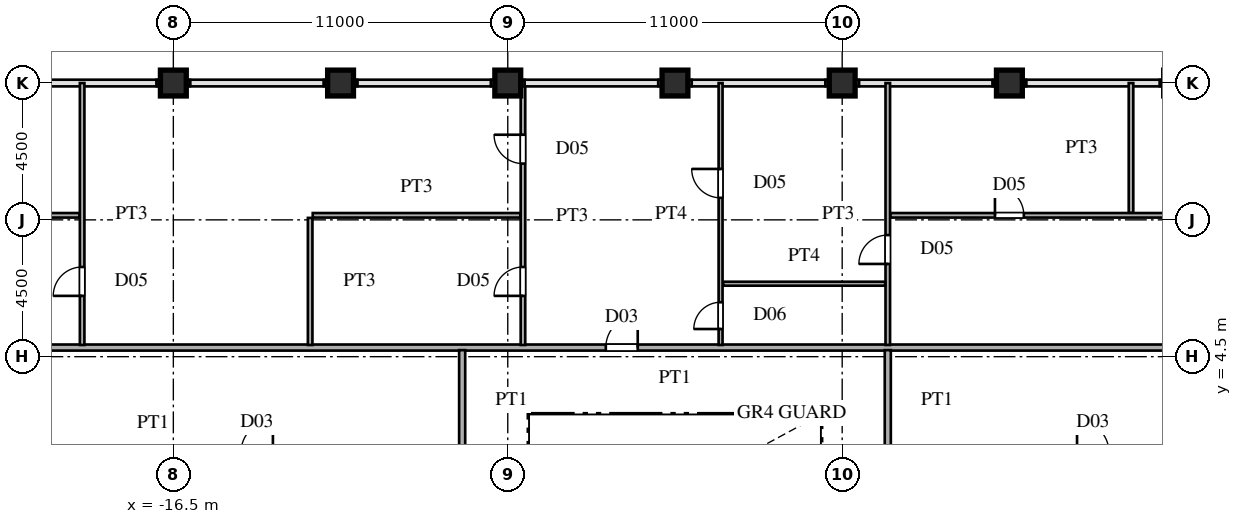
"""IFC4 building model, lengths in metres.
Left out: names, types, materials, properties, quantities, classifications, styles, units other than length and angle.
Written with IfcOpenShell. Run it as: python <this file> out.ifc"""

import sys

from ifc_helpers import new_model, si_unit, direction, frame, frame_2d, origin, origin_2d, place, context, subcontext, project, spatial, rectangle, hollow_rectangle, extrude, source, transform, mapped, element, fill, save


model = new_model("IFC4")
c1 = context("Model", 3, precision=1e-05, world=origin(), true_north=direction((0.0, 1.0)))
c2 = subcontext(c1, "Body", "Model", "MODEL_VIEW")
j1 = project(units=[si_unit("LENGTHUNIT", "METRE"), si_unit("PLANEANGLEUNIT", "RADIAN")], contexts=[c1])
p1 = place(None, origin())
s1 = spatial("IfcSite", under=j1, at=p1, CompositionType="ELEMENT")
p2 = place(p1, origin())
s2 = spatial("IfcBuilding", under=s1, at=p2, CompositionType="ELEMENT")
p3 = place(p2, frame((0.0, 0.0, 250.65)))
s3 = spatial("IfcBuildingStorey", under=s2, at=p3, CompositionType="ELEMENT", Elevation=250.65)
m1 = source(origin(), c2, "Body", "SweptSolid", [
    extrude(hollow_rectangle(XDim=0.85, YDim=0.85, WallThickness=0.036, at=origin_2d()), origin(), (0.0, 0.0, 1.0), 3.75),
])
for number, where, z_axis, x_axis in (
    (1, (-16.5, 13.5, 0.0), (0.0, 0.0, 1.0), (1.0, 0.0, 0.0)),
    (2, (-11.0, 13.5, 0.0), (0.0, 0.0, 1.0), (1.0, 0.0, 0.0)),
    (3, (-5.5, 13.5, 0.0), (0.0, 0.0, 1.0), (1.0, 0.0, 0.0)),
    (4, (0.0, 13.5, 0.0), (0.0, 0.0, 1.0), (1.0, 0.0, 0.0)),
    (5, (5.5, 13.5, 0.0), (0.0, 0.0, 1.0), (1.0, 0.0, 0.0)),
    (6, (11.0, 13.5, 0.0), (0.0, 0.0, 1.0), (1.0, 0.0, 0.0)),
):
    element("IfcColumn", number, at=place(p3, frame(where, z_axis=z_axis, x_axis=x_axis)), inside=s3, PredefinedType="COLUMN", context=c2, shape_type="MappedRepresentation", body=[
        mapped(m1, transform((0.0, 0.0, 0.0), scale=1.0)),
    ])
for number, where, z_axis, x_axis in (
    (7, (-17.05, 13.5, 0.0), (0.0, 0.0, 1.0), (1.0, 0.0, 0.0)),
    (8, (-11.55, 13.5, 0.0), (0.0, 0.0, 1.0), (1.0, 0.0, 0.0)),
    (9, (-6.05, 13.5, 0.0), (0.0, 0.0, 1.0), (1.0, 0.0, 0.0)),
    (10, (-0.55, 13.5, 0.0), (0.0, 0.0, 1.0), (1.0, 0.0, 0.0)),
    (11, (4.95, 13.5, 0.0), (0.0, 0.0, 1.0), (1.0, 0.0, 0.0)),
    (12, (10.45, 13.5, 0.0), (0.0, 0.0, 1.0), (1.0, 0.0, 0.0)),
    (13, (15.95, 13.5, 0.0), (0.0, 0.0, 1.0), (1.0, 0.0, 0.0)),
):
    element("IfcWall", number, at=place(p3, frame(where, z_axis=z_axis, x_axis=x_axis)), inside=s3, PredefinedType="SOLIDWALL", context=c2, shape_type="SweptSolid", body=[
        extrude(rectangle(XDim=1.1, YDim=0.21, at=frame_2d((0.55, 0.0))), origin(), (0.0, 0.0, 1.0), 3.03),
    ])
p4 = place(p3, frame((-27.245, 4.8, 0.0), z_axis=(0.0, 0.0, 1.0), x_axis=(1.0, 0.0, 0.0)))
e14 = element("IfcWall", 14, at=p4, inside=s3, PredefinedType="PARTITIONING", context=c2, shape_type="SweptSolid", body=[
    extrude(rectangle(XDim=54.49, YDim=0.2, at=frame_2d((27.245, 0.0))), origin(), (0.0, 0.0, 1.0), 3.53),
])
p5 = place(p4, frame((24.97, 0.0, 0.0)))
e15 = element("IfcOpeningElement", 15, at=p5, cuts=e14, PredefinedType="OPENING", context=c2, shape_type="SweptSolid", body=[
    extrude(rectangle(XDim=1.05, YDim=2.25, at=frame_2d((0.525, 1.125))), frame((0.0, 0.11, 0.0), z_axis=(0.0, -1.0, 0.0), x_axis=(1.0, 0.0, 0.0)), (0.0, 0.0, 1.0), 0.22),
])
p6 = place(p3, frame((1.585, 6.9, 0.0), z_axis=(0.0, 0.0, 1.0), x_axis=(1.0, 0.0, 0.0)))
e16 = element("IfcWall", 16, at=p6, inside=s3, PredefinedType="PARTITIONING", context=c2, shape_type="SweptSolid", body=[
    extrude(rectangle(XDim=5.33, YDim=0.13, at=frame_2d((2.665, 0.0))), origin(), (0.0, 0.0, 1.0), 3.53),
])
p7 = place(p3, frame((-27.245, 9.15, 0.0), z_axis=(0.0, 0.0, 1.0), x_axis=(1.0, 0.0, 0.0)))
e17 = element("IfcWall", 17, at=p7, inside=s3, PredefinedType="PARTITIONING", context=c2, shape_type="SweptSolid", body=[
    extrude(rectangle(XDim=7.66, YDim=0.15, at=frame_2d((3.83, 0.0))), origin(), (0.0, 0.0, 1.0), 3.53),
])
p8 = place(p7, frame((3.57, 0.0, 0.0)))
e18 = element("IfcOpeningElement", 18, at=p8, cuts=e17, PredefinedType="OPENING", context=c2, shape_type="SweptSolid", body=[
    extrude(rectangle(XDim=0.95, YDim=2.15, at=frame_2d((0.475, 1.075))), frame((0.0, 0.085, 0.0), z_axis=(0.0, -1.0, 0.0), x_axis=(1.0, 0.0, 0.0)), (0.0, 0.0, 1.0), 0.17),
])
p9 = place(p3, frame((-11.915, 9.15, 0.0), z_axis=(0.0, 0.0, 1.0), x_axis=(1.0, 0.0, 0.0)))
e19 = element("IfcWall", 19, at=p9, inside=s3, PredefinedType="PARTITIONING", context=c2, shape_type="SweptSolid", body=[
    extrude(rectangle(XDim=6.83, YDim=0.15, at=frame_2d((3.415, 0.0))), origin(), (0.0, 0.0, 1.0), 3.53),
])
p10 = place(p3, frame((7.085, 9.15, 0.0), z_axis=(0.0, 0.0, 1.0), x_axis=(1.0, 0.0, 0.0)))
e20 = element("IfcWall", 20, at=p10, inside=s3, PredefinedType="PARTITIONING", context=c2, shape_type="SweptSolid", body=[
    extrude(rectangle(XDim=20.16, YDim=0.15, at=frame_2d((10.08, 0.0))), origin(), (0.0, 0.0, 1.0), 3.53),
])
p11 = place(p10, frame((3.44, 0.0, 0.0)))
e21 = element("IfcOpeningElement", 21, at=p11, cuts=e20, PredefinedType="OPENING", context=c2, shape_type="SweptSolid", body=[
    extrude(rectangle(XDim=0.95, YDim=2.15, at=frame_2d((0.475, 1.075))), frame((0.0, 0.085, 0.0), z_axis=(0.0, -1.0, 0.0), x_axis=(1.0, 0.0, 0.0)), (0.0, 0.0, 1.0), 0.17),
])
p12 = place(p10, frame((10.69, 0.0, 0.0)))
e22 = element("IfcOpeningElement", 22, at=p12, cuts=e20, PredefinedType="OPENING", context=c2, shape_type="SweptSolid", body=[
    extrude(rectangle(XDim=0.95, YDim=2.15, at=frame_2d((0.475, 1.075))), frame((0.0, 0.085, 0.0), z_axis=(0.0, -1.0, 0.0), x_axis=(1.0, 0.0, 0.0)), (0.0, 0.0, 1.0), 0.17),
])
p13 = place(p10, frame((16.94, 0.0, 0.0)))
e23 = element("IfcOpeningElement", 23, at=p13, cuts=e20, PredefinedType="OPENING", context=c2, shape_type="SweptSolid", body=[
    extrude(rectangle(XDim=0.95, YDim=2.15, at=frame_2d((0.475, 1.075))), frame((0.0, 0.085, 0.0), z_axis=(0.0, -1.0, 0.0), x_axis=(1.0, 0.0, 0.0)), (0.0, 0.0, 1.0), 0.17),
])
p14 = place(p3, frame((-19.5, 4.885, 0.0), z_axis=(0.0, 0.0, 1.0), x_axis=(0.0, 1.0, 0.0)))
e24 = element("IfcWall", 24, at=p14, inside=s3, PredefinedType="PARTITIONING", context=c2, shape_type="SweptSolid", body=[
    extrude(rectangle(XDim=8.615, YDim=0.15, at=frame_2d((4.308, 0.0))), origin(), (0.0, 0.0, 1.0), 3.53),
])
p15 = place(p14, frame((1.615, 0.0, 0.0)))
e25 = element("IfcOpeningElement", 25, at=p15, cuts=e24, PredefinedType="OPENING", context=c2, shape_type="SweptSolid", body=[
    extrude(rectangle(XDim=0.95, YDim=2.15, at=frame_2d((0.475, 1.075))), frame((0.0, 0.085, 0.0), z_axis=(0.0, -1.0, 0.0), x_axis=(1.0, 0.0, 0.0)), (0.0, 0.0, 1.0), 0.17),
])
p16 = place(p3, frame((-12.0, 4.885, 0.0), z_axis=(0.0, 0.0, 1.0), x_axis=(0.0, 1.0, 0.0)))
e26 = element("IfcWall", 26, at=p16, inside=s3, PredefinedType="PARTITIONING", context=c2, shape_type="SweptSolid", body=[
    extrude(rectangle(XDim=4.18, YDim=0.15, at=frame_2d((2.09, 0.0))), origin(), (0.0, 0.0, 1.0), 3.53),
])
p17 = place(p3, frame((-7.0, 1.435, 0.0), z_axis=(0.0, 0.0, 1.0), x_axis=(0.0, 1.0, 0.0)))
e27 = element("IfcWall", 27, at=p17, inside=s3, PredefinedType="PARTITIONING", context=c2, shape_type="SweptSolid", body=[
    extrude(rectangle(XDim=3.28, YDim=0.2, at=frame_2d((1.64, 0.0))), origin(), (0.0, 0.0, 1.0), 3.53),
])
p18 = place(p3, frame((-5.0, 4.885, 0.0), z_axis=(0.0, 0.0, 1.0), x_axis=(0.0, 1.0, 0.0)))
e28 = element("IfcWall", 28, at=p18, inside=s3, PredefinedType="PARTITIONING", context=c2, shape_type="SweptSolid", body=[
    extrude(rectangle(XDim=8.505, YDim=0.15, at=frame_2d((4.252, 0.0))), origin(), (0.0, 0.0, 1.0), 3.53),
])
p19 = place(p18, frame((1.615, 0.0, 0.0)))
e29 = element("IfcOpeningElement", 29, at=p19, cuts=e28, PredefinedType="OPENING", context=c2, shape_type="SweptSolid", body=[
    extrude(rectangle(XDim=0.95, YDim=2.15, at=frame_2d((0.475, 1.075))), frame((0.0, 0.085, 0.0), z_axis=(0.0, -1.0, 0.0), x_axis=(1.0, 0.0, 0.0)), (0.0, 0.0, 1.0), 0.17),
])
p20 = place(p18, frame((5.965, 0.0, 0.0)))
e30 = element("IfcOpeningElement", 30, at=p20, cuts=e28, PredefinedType="OPENING", context=c2, shape_type="SweptSolid", body=[
    extrude(rectangle(XDim=0.95, YDim=2.15, at=frame_2d((0.475, 1.075))), frame((0.0, 0.085, 0.0), z_axis=(0.0, -1.0, 0.0), x_axis=(1.0, 0.0, 0.0)), (0.0, 0.0, 1.0), 0.17),
])
p21 = place(p3, frame((1.5, 4.885, 0.0), z_axis=(0.0, 0.0, 1.0), x_axis=(0.0, 1.0, 0.0)))
e31 = element("IfcWall", 31, at=p21, inside=s3, PredefinedType="PARTITIONING", context=c2, shape_type="SweptSolid", body=[
    extrude(rectangle(XDim=8.615, YDim=0.13, at=frame_2d((4.308, 0.0))), origin(), (0.0, 0.0, 1.0), 3.53),
])
p22 = place(p21, frame((0.525, 0.0, 0.0)))
e32 = element("IfcOpeningElement", 32, at=p22, cuts=e31, PredefinedType="OPENING", context=c2, shape_type="SweptSolid", body=[
    extrude(rectangle(XDim=0.88, YDim=2.1, at=frame_2d((0.44, 1.05))), frame((0.0, 0.075, 0.0), z_axis=(0.0, -1.0, 0.0), x_axis=(1.0, 0.0, 0.0)), (0.0, 0.0, 1.0), 0.15),
])
p23 = place(p21, frame((4.84, 0.0, 0.0)))
e33 = element("IfcOpeningElement", 33, at=p23, cuts=e31, PredefinedType="OPENING", context=c2, shape_type="SweptSolid", body=[
    extrude(rectangle(XDim=0.95, YDim=2.15, at=frame_2d((0.475, 1.075))), frame((0.0, 0.075, 0.0), z_axis=(0.0, -1.0, 0.0), x_axis=(1.0, 0.0, 0.0)), (0.0, 0.0, 1.0), 0.15),
])
p24 = place(p3, frame((7.0, 1.435, 0.0), z_axis=(0.0, 0.0, 1.0), x_axis=(0.0, 1.0, 0.0)))
e34 = element("IfcWall", 34, at=p24, inside=s3, PredefinedType="PARTITIONING", context=c2, shape_type="SweptSolid", body=[
    extrude(rectangle(XDim=3.28, YDim=0.2, at=frame_2d((1.64, 0.0))), origin(), (0.0, 0.0, 1.0), 3.53),
])
p25 = place(p3, frame((7.0, 4.885, 0.0), z_axis=(0.0, 0.0, 1.0), x_axis=(0.0, 1.0, 0.0)))
e35 = element("IfcWall", 35, at=p25, inside=s3, PredefinedType="PARTITIONING", context=c2, shape_type="SweptSolid", body=[
    extrude(rectangle(XDim=8.615, YDim=0.15, at=frame_2d((4.308, 0.0))), origin(), (0.0, 0.0, 1.0), 3.53),
])
p26 = place(p25, frame((2.665, 0.0, 0.0)))
e36 = element("IfcOpeningElement", 36, at=p26, cuts=e35, PredefinedType="OPENING", context=c2, shape_type="SweptSolid", body=[
    extrude(rectangle(XDim=0.95, YDim=2.15, at=frame_2d((0.475, 1.075))), frame((0.0, 0.085, 0.0), z_axis=(0.0, -1.0, 0.0), x_axis=(1.0, 0.0, 0.0)), (0.0, 0.0, 1.0), 0.17),
])
p27 = place(p3, frame((15.0, 9.235, 0.0), z_axis=(0.0, 0.0, 1.0), x_axis=(0.0, 1.0, 0.0)))
e37 = element("IfcWall", 37, at=p27, inside=s3, PredefinedType="PARTITIONING", context=c2, shape_type="SweptSolid", body=[
    extrude(rectangle(XDim=4.265, YDim=0.15, at=frame_2d((2.132, 0.0))), origin(), (0.0, 0.0, 1.0), 3.53),
])
m2 = source(origin(), c2, "Body", "SweptSolid", [
    extrude(rectangle(XDim=1.05, YDim=2.25, at=frame_2d((0.525, 1.125))), frame((0.0, 0.025, 0.0), z_axis=(0.0, -1.0, 0.0), x_axis=(1.0, 0.0, 0.0)), (0.0, 0.0, 1.0), 0.05),
])
p28 = place(p5, origin())
e38 = element("IfcDoor", 38, at=p28, inside=s3, OperationType="SINGLE_SWING_RIGHT", PredefinedType="DOOR", context=c2, shape_type="MappedRepresentation", body=[
    mapped(m2, transform((0.0, 0.0, 0.0), scale=1.0)),
])
fill(e15, e38)
m3 = source(origin(), c2, "Body", "SweptSolid", [
    extrude(rectangle(XDim=0.95, YDim=2.15, at=frame_2d((0.475, 1.075))), frame((0.0, 0.025, 0.0), z_axis=(0.0, -1.0, 0.0), x_axis=(1.0, 0.0, 0.0)), (0.0, 0.0, 1.0), 0.05),
])
p29 = place(p11, origin())
e39 = element("IfcDoor", 39, at=p29, inside=s3, OperationType="SINGLE_SWING_LEFT", PredefinedType="DOOR", context=c2, shape_type="MappedRepresentation", body=[
    mapped(m3, transform((0.0, 0.0, 0.0), scale=1.0)),
])
fill(e21, e39)
p30 = place(p15, origin())
e40 = element("IfcDoor", 40, at=p30, inside=s3, OperationType="SINGLE_SWING_LEFT", PredefinedType="DOOR", context=c2, shape_type="MappedRepresentation", body=[
    mapped(m3, transform((0.0, 0.0, 0.0), scale=1.0)),
])
fill(e25, e40)
p31 = place(p19, origin())
e41 = element("IfcDoor", 41, at=p31, inside=s3, OperationType="SINGLE_SWING_LEFT", PredefinedType="DOOR", context=c2, shape_type="MappedRepresentation", body=[
    mapped(m3, transform((0.0, 0.0, 0.0), scale=1.0)),
])
fill(e29, e41)
p32 = place(p20, origin())
e42 = element("IfcDoor", 42, at=p32, inside=s3, OperationType="SINGLE_SWING_RIGHT", PredefinedType="DOOR", context=c2, shape_type="MappedRepresentation", body=[
    mapped(m3, transform((0.0, 0.0, 0.0), scale=1.0)),
])
fill(e30, e42)
m4 = source(origin(), c2, "Body", "SweptSolid", [
    extrude(rectangle(XDim=0.88, YDim=2.1, at=frame_2d((0.44, 1.05))), frame((0.0, 0.025, 0.0), z_axis=(0.0, -1.0, 0.0), x_axis=(1.0, 0.0, 0.0)), (0.0, 0.0, 1.0), 0.05),
])
p33 = place(p22, origin())
e43 = element("IfcDoor", 43, at=p33, inside=s3, OperationType="SINGLE_SWING_LEFT", PredefinedType="DOOR", context=c2, shape_type="MappedRepresentation", body=[
    mapped(m4, transform((0.0, 0.0, 0.0), scale=1.0)),
])
fill(e32, e43)
p34 = place(p23, origin())
e44 = element("IfcDoor", 44, at=p34, inside=s3, OperationType="SINGLE_SWING_RIGHT", PredefinedType="DOOR", context=c2, shape_type="MappedRepresentation", body=[
    mapped(m3, transform((0.0, 0.0, 0.0), scale=1.0)),
])
fill(e33, e44)
p35 = place(p26, origin())
e45 = element("IfcDoor", 45, at=p35, inside=s3, OperationType="SINGLE_SWING_LEFT", PredefinedType="DOOR", context=c2, shape_type="MappedRepresentation", body=[
    mapped(m3, transform((0.0, 0.0, 0.0), scale=1.0)),
])
fill(e36, e45)
save(model, sys.argv[1])
